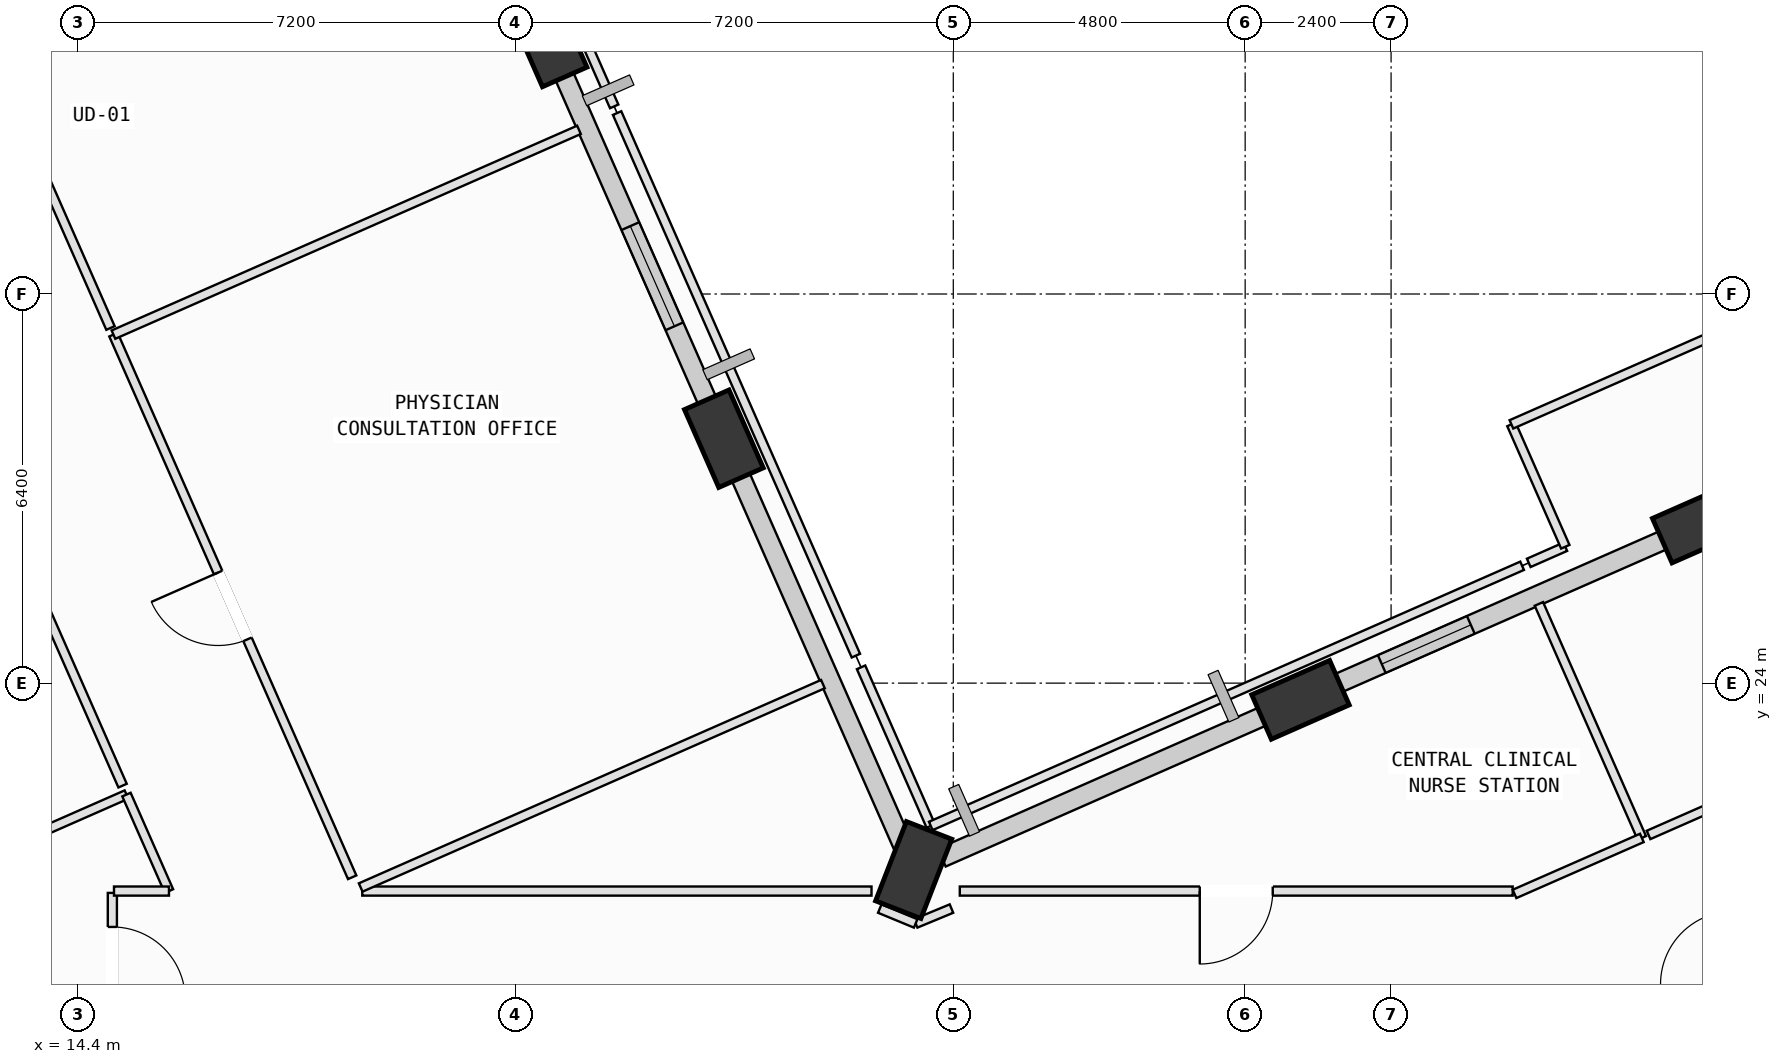
"""IFC4 building model, lengths in metres.
Left out: names, types, materials, properties, quantities, classifications, styles, units other than length and angle.
Written with IfcOpenShell. Run it as: python <this file> out.ifc"""

import sys

from ifc_helpers import new_model, si_unit, direction, frame, frame_2d, origin, origin_2d, place, context, subcontext, project, spatial, rectangle, extrude, element, fill, save


model = new_model("IFC4")
c1 = context("Model", 3, precision=1e-05, world=origin(), true_north=direction((0.0, 1.0)))
c2 = subcontext(c1, "Body", "Model", "MODEL_VIEW")
j1 = project(units=[si_unit("LENGTHUNIT", "METRE"), si_unit("PLANEANGLEUNIT", "RADIAN")], contexts=[c1])
p1 = place(None, origin())
s1 = spatial("IfcSite", under=j1, at=p1, CompositionType="ELEMENT")
p2 = place(p1, origin())
s2 = spatial("IfcBuilding", under=s1, at=p2, CompositionType="ELEMENT")
p3 = place(p2, frame((0.0, 0.0, 124.4)))
s3 = spatial("IfcBuildingStorey", under=s2, at=p3, CompositionType="ELEMENT", Elevation=124.4)
p4 = place(p3, frame((41.1, 26.625, 0.002), z_axis=(-0.007815657452, 0.031018390514, 0.999488256534), x_axis=(-0.789216489243, -0.613979935335, 0.012883016466)))
e1 = element("IfcColumn", 1, at=p4, inside=s3, PredefinedType="COLUMN", context=c2, shape_type="SweptSolid", body=[
    extrude(rectangle(XDim=1.4, YDim=0.8, at=origin_2d()), origin(), (0.0, 0.0, 1.0), 3.998),
])
p5 = place(p3, frame((34.51, 23.725, 0.002), z_axis=(0.004459571961, 0.003848671693, 0.999982649822), x_axis=(-0.902915160406, 0.429812266681, 0.002372449991)))
e2 = element("IfcColumn", 2, at=p5, inside=s3, PredefinedType="COLUMN", context=c2, shape_type="SweptSolid", body=[
    extrude(rectangle(XDim=1.4, YDim=0.8, at=origin_2d()), origin(), (0.0, 0.0, 1.0), 3.996),
])
p6 = place(p3, frame((28.148, 20.926, 0.002), z_axis=(0.016243980514, -0.022472875297, 0.999615477558), x_axis=(-0.252034809293, 0.967373020719, 0.025843639251)))
e3 = element("IfcColumn", 3, at=p6, inside=s3, PredefinedType="COLUMN", context=c2, shape_type="SweptSolid", body=[
    extrude(rectangle(XDim=1.4, YDim=0.8, at=origin_2d()), origin(), (0.0, 0.0, 1.0), 3.998),
])
p7 = place(p3, frame((25.027, 28.02, 0.002), z_axis=(-0.013064065171, -0.03565146757, 0.999278891532), x_axis=(-0.063457059536, 0.997379243296, 0.034754088053)))
e4 = element("IfcColumn", 4, at=p7, inside=s3, PredefinedType="COLUMN", context=c2, shape_type="SweptSolid", body=[
    extrude(rectangle(XDim=1.4, YDim=0.8, at=origin_2d()), origin(), (0.0, 0.0, 1.0), 3.999),
])
p8 = place(p3, frame((22.127, 34.61, 0.002), z_axis=(-0.040180454618, -0.047801936905, 0.998048348476), x_axis=(0.279502323425, 0.958442212202, 0.057157476053)))
e5 = element("IfcColumn", 5, at=p8, inside=s3, PredefinedType="COLUMN", context=c2, shape_type="SweptSolid", body=[
    extrude(rectangle(XDim=1.4, YDim=0.8, at=origin_2d()), origin(), (0.0, 0.0, 1.0), 4.004),
])
p9 = place(p3, frame((34.974, 23.93, 0.0), z_axis=(0.0, 0.0, 1.0), x_axis=(0.915298223489, 0.402776814227, 0.0)))
e6 = element("IfcWall", 6, at=p9, inside=s3, PredefinedType="SOLIDWALL", context=c2, shape_type="SweptSolid", body=[
    extrude(rectangle(XDim=6.211, YDim=0.32, at=frame_2d((3.105, 0.0))), origin(), (0.0, 0.0, 1.0), 3.165),
])
p10 = place(p9, frame((0.953, 0.0, 0.75)))
e7 = element("IfcOpeningElement", 7, at=p10, cuts=e6, PredefinedType="OPENING", context=c2, shape_type="SweptSolid", body=[
    extrude(rectangle(XDim=1.6, YDim=1.95, at=frame_2d((0.8, 0.975))), frame((0.0, 0.17, 0.0), z_axis=(0.0, -1.0, 0.0), x_axis=(1.0, 0.0, 0.0)), (0.0, 0.0, 1.0), 0.34),
])
p11 = place(p3, frame((28.611, 21.13, 0.0), z_axis=(0.0, 0.0, 1.0), x_axis=(0.915312012357, 0.402745477981, 0.0)))
e8 = element("IfcWall", 8, at=p11, inside=s3, PredefinedType="SOLIDWALL", context=c2, shape_type="SweptSolid", body=[
    extrude(rectangle(XDim=5.96, YDim=0.32, at=frame_2d((2.98, 0.0))), origin(), (0.0, 0.0, 1.0), 3.165),
])
p12 = place(p3, frame((25.248, 27.518, 0.0), z_axis=(0.0, 0.0, 1.0), x_axis=(0.402757978955, -0.915306511715, 0.0)))
e9 = element("IfcWall", 9, at=p12, inside=s3, PredefinedType="SOLIDWALL", context=c2, shape_type="SweptSolid", body=[
    extrude(rectangle(XDim=6.76, YDim=0.32, at=frame_2d((3.38, 0.0))), origin(), (0.0, 0.0, 1.0), 3.165),
])
p13 = place(p3, frame((22.344, 34.117, 0.0), z_axis=(0.0, 0.0, 1.0), x_axis=(0.402732040275, -0.915317924951, 0.0)))
e10 = element("IfcWall", 10, at=p13, inside=s3, PredefinedType="SOLIDWALL", context=c2, shape_type="SweptSolid", body=[
    extrude(rectangle(XDim=6.223, YDim=0.32, at=frame_2d((3.111, 0.0))), origin(), (0.0, 0.0, 1.0), 3.165),
])
p14 = place(p13, frame((2.841, 0.0, 0.75)))
e11 = element("IfcOpeningElement", 11, at=p14, cuts=e10, PredefinedType="OPENING", context=c2, shape_type="SweptSolid", body=[
    extrude(rectangle(XDim=1.8, YDim=2.05, at=frame_2d((0.9, 1.025))), frame((0.0, 0.17, 0.0), z_axis=(0.0, -1.0, 0.0), x_axis=(1.0, 0.0, 0.0)), (0.0, 0.0, 1.0), 0.34),
])
p15 = place(p3, frame((36.5, 16.79, 0.0), z_axis=(0.0, 0.0, 1.0), x_axis=(0.915322583173, 0.402721453034, 0.0)))
e12 = element("IfcWall", 12, at=p15, inside=s3, PredefinedType="PARTITIONING", context=c2, shape_type="SweptSolid", body=[
    extrude(rectangle(XDim=10.012, YDim=0.15, at=frame_2d((5.006, 0.0))), origin(), (0.0, 0.0, 1.0), 2.965),
])
p16 = place(p15, frame((4.406, 0.0, 0.0)))
e13 = element("IfcOpeningElement", 13, at=p16, cuts=e12, PredefinedType="OPENING", context=c2, shape_type="SweptSolid", body=[
    extrude(rectangle(XDim=1.2, YDim=2.15, at=frame_2d((0.6, 1.075))), frame((0.0, 0.085, 0.0), z_axis=(0.0, -1.0, 0.0), x_axis=(1.0, 0.0, 0.0)), (0.0, 0.0, 1.0), 0.17),
])
p17 = place(p3, frame((14.97, 20.55, 0.0), z_axis=(0.0, 0.0, 1.0), x_axis=(0.0, -1.0, 0.0)))
e14 = element("IfcWall", 14, at=p17, inside=s3, PredefinedType="PARTITIONING", context=c2, shape_type="SweptSolid", body=[
    extrude(rectangle(XDim=2.32, YDim=0.15, at=frame_2d((1.16, 0.0))), origin(), (0.0, 0.0, 1.0), 3.78),
])
p18 = place(p17, frame((0.56, 0.0, 0.0)))
e15 = element("IfcOpeningElement", 15, at=p18, cuts=e14, PredefinedType="OPENING", context=c2, shape_type="SweptSolid", body=[
    extrude(rectangle(XDim=1.2, YDim=2.15, at=frame_2d((0.6, 1.075))), frame((0.0, 0.085, 0.0), z_axis=(0.0, -1.0, 0.0), x_axis=(1.0, 0.0, 0.0)), (0.0, 0.0, 1.0), 0.17),
])
p19 = place(p3, frame((6.584, 18.376, 0.0), z_axis=(0.0, 0.0, 1.0), x_axis=(0.915349059645, 0.402661270806, 0.0)))
e16 = element("IfcWall", 16, at=p19, inside=s3, PredefinedType="PARTITIONING", context=c2, shape_type="SweptSolid", body=[
    extrude(rectangle(XDim=9.415, YDim=0.15, at=frame_2d((4.708, 0.0))), origin(), (0.0, 0.0, 1.0), 3.78),
])
p20 = place(p3, frame((15.202, 22.167, 0.0), z_axis=(0.0, 0.0, 1.0), x_axis=(0.403092455814, -0.915159260493, 0.0)))
e17 = element("IfcWall", 17, at=p20, inside=s3, PredefinedType="PARTITIONING", context=c2, shape_type="SweptSolid", body=[
    extrude(rectangle(XDim=1.734, YDim=0.15, at=frame_2d((0.867, 0.0))), origin(), (0.0, 0.0, 1.0), 3.78),
])
p21 = place(p3, frame((15.901, 20.58, 0.0), z_axis=(0.0, 0.0, 1.0), x_axis=(-1.0, 0.0, 0.0)))
e18 = element("IfcWall", 18, at=p21, inside=s3, PredefinedType="PARTITIONING", context=c2, shape_type="SweptSolid", body=[
    extrude(rectangle(XDim=0.904, YDim=0.15, at=frame_2d((0.452, 0.0))), origin(), (0.0, 0.0, 1.0), 3.78),
])
p22 = place(p3, frame((9.805, 34.433, 0.0), z_axis=(0.0, 0.0, 1.0), x_axis=(0.402775689137, -0.915298718583, 0.0)))
e19 = element("IfcWall", 19, at=p22, inside=s3, PredefinedType="PARTITIONING", context=c2, shape_type="SweptSolid", body=[
    extrude(rectangle(XDim=13.241, YDim=0.15, at=frame_2d((6.62, 0.0))), origin(), (0.0, 0.0, 1.0), 2.965),
])
p23 = place(p22, frame((6.02, 0.0, 0.0)))
e20 = element("IfcOpeningElement", 20, at=p23, cuts=e19, PredefinedType="OPENING", context=c2, shape_type="SweptSolid", body=[
    extrude(rectangle(XDim=1.2, YDim=2.15, at=frame_2d((0.6, 1.075))), frame((0.0, 0.085, 0.0), z_axis=(0.0, -1.0, 0.0), x_axis=(1.0, 0.0, 0.0)), (0.0, 0.0, 1.0), 0.17),
])
p24 = place(p3, frame((38.0, 20.58, 0.0), z_axis=(0.0, 0.0, 1.0), x_axis=(-1.0, 0.0, 0.0)))
e21 = element("IfcWall", 21, at=p24, inside=s3, PredefinedType="PARTITIONING", context=c2, shape_type="SweptSolid", body=[
    extrude(rectangle(XDim=9.093, YDim=0.15, at=frame_2d((4.546, 0.0))), origin(), (0.0, 0.0, 1.0), 3.365),
])
p25 = place(p24, frame((3.947, 0.0, 0.0)))
e22 = element("IfcOpeningElement", 22, at=p25, cuts=e21, PredefinedType="OPENING", context=c2, shape_type="SweptSolid", body=[
    extrude(rectangle(XDim=1.2, YDim=2.15, at=frame_2d((0.6, 1.075))), frame((0.0, 0.085, 0.0), z_axis=(0.0, -1.0, 0.0), x_axis=(1.0, 0.0, 0.0)), (0.0, 0.0, 1.0), 0.17),
])
p26 = place(p3, frame((28.77, 20.292, 0.0), z_axis=(0.0, 0.0, 1.0), x_axis=(-0.923946844683, -0.382520885967, 0.0)))
e23 = element("IfcWall", 23, at=p26, inside=s3, PredefinedType="PARTITIONING", context=c2, shape_type="SweptSolid", body=[
    extrude(rectangle(XDim=0.638, YDim=0.15, at=frame_2d((0.319, 0.0))), origin(), (0.0, 0.0, 1.0), 3.78),
])
p27 = place(p3, frame((28.181, 20.048, 0.0), z_axis=(0.0, 0.0, 1.0), x_axis=(-0.924114659462, 0.382115291723, 0.0)))
e24 = element("IfcWall", 24, at=p27, inside=s3, PredefinedType="PARTITIONING", context=c2, shape_type="SweptSolid", body=[
    extrude(rectangle(XDim=0.638, YDim=0.15, at=frame_2d((0.319, 0.0))), origin(), (0.0, 0.0, 1.0), 3.78),
])
p28 = place(p3, frame((27.455, 20.58, 0.0), z_axis=(0.0, 0.0, 1.0), x_axis=(-1.0, 0.0, 0.0)))
e25 = element("IfcWall", 25, at=p28, inside=s3, PredefinedType="PARTITIONING", context=c2, shape_type="SweptSolid", body=[
    extrude(rectangle(XDim=8.375, YDim=0.15, at=frame_2d((4.188, 0.0))), origin(), (0.0, 0.0, 1.0), 3.78),
])
p29 = place(p3, frame((19.054, 20.639, 0.0), z_axis=(0.0, 0.0, 1.0), x_axis=(0.915311998294, 0.402745509944, 0.0)))
e26 = element("IfcWall", 26, at=p29, inside=s3, PredefinedType="PARTITIONING", context=c2, shape_type="SweptSolid", body=[
    extrude(rectangle(XDim=8.305, YDim=0.15, at=frame_2d((4.153, 0.0))), origin(), (0.0, 0.0, 1.0), 3.78),
])
p30 = place(p3, frame((27.283, 24.26, 0.0), z_axis=(0.0, 0.0, 1.0), x_axis=(0.402431432168, -0.91545013103, 0.0)))
e27 = element("IfcWall", 27, at=p30, inside=s3, PredefinedType="PARTITIONING", context=c2, shape_type="SweptSolid", body=[
    extrude(rectangle(XDim=2.85, YDim=0.15, at=frame_2d((1.425, 0.0))), origin(), (0.0, 0.0, 1.0), 3.78),
])
p31 = place(p3, frame((28.43, 21.651, 0.0), z_axis=(0.0, 0.0, 1.0), x_axis=(0.915314693601, 0.402739384314, 0.0)))
e28 = element("IfcWall", 28, at=p31, inside=s3, PredefinedType="PARTITIONING", context=c2, shape_type="SweptSolid", body=[
    extrude(rectangle(XDim=10.625, YDim=0.15, at=frame_2d((5.312, 0.0))), origin(), (0.0, 0.0, 1.0), 3.78),
])
p32 = place(p3, frame((38.431, 25.303, 0.0), z_axis=(0.0, 0.0, 1.0), x_axis=(0.402660781554, -0.915349274866, 0.0)))
e29 = element("IfcWall", 29, at=p32, inside=s3, PredefinedType="PARTITIONING", context=c2, shape_type="SweptSolid", body=[
    extrude(rectangle(XDim=4.205, YDim=0.15, at=frame_2d((2.103, 0.0))), origin(), (0.0, 0.0, 1.0), 3.78),
])
p33 = place(p3, frame((40.124, 21.454, 0.0), z_axis=(0.0, 0.0, 1.0), x_axis=(-0.915349649127, -0.402659930763, 0.0)))
e30 = element("IfcWall", 30, at=p33, inside=s3, PredefinedType="PARTITIONING", context=c2, shape_type="SweptSolid", body=[
    extrude(rectangle(XDim=2.288, YDim=0.15, at=frame_2d((1.144, 0.0))), origin(), (0.0, 0.0, 1.0), 3.78),
])
p34 = place(p3, frame((55.739, 28.326, 0.0), z_axis=(0.0, 0.0, 1.0), x_axis=(-0.915298880847, -0.402775320396, 0.0)))
e31 = element("IfcWall", 31, at=p34, inside=s3, PredefinedType="PARTITIONING", context=c2, shape_type="SweptSolid", body=[
    extrude(rectangle(XDim=16.94, YDim=0.15, at=frame_2d((8.47, 0.0))), origin(), (0.0, 0.0, 1.0), 2.945),
])
p35 = place(p34, frame((7.87, 0.0, 0.0)))
e32 = element("IfcOpeningElement", 32, at=p35, cuts=e31, PredefinedType="OPENING", context=c2, shape_type="SweptSolid", body=[
    extrude(rectangle(XDim=1.2, YDim=2.15, at=frame_2d((0.6, 1.075))), frame((0.0, 0.085, 0.0), z_axis=(0.0, -1.0, 0.0), x_axis=(1.0, 0.0, 0.0)), (0.0, 0.0, 1.0), 0.17),
])
p36 = place(p3, frame((38.264, 25.978, 0.0), z_axis=(0.0, 0.0, 1.0), x_axis=(0.915079211877, 0.403274144958, 0.0)))
e33 = element("IfcWall", 33, at=p36, inside=s3, PredefinedType="PARTITIONING", context=c2, shape_type="SweptSolid", body=[
    extrude(rectangle(XDim=0.657, YDim=0.15, at=frame_2d((0.328, 0.0))), origin(), (0.0, 0.0, 1.0), 3.78),
])
p37 = place(p3, frame((38.865, 26.243, 0.0), z_axis=(0.0, 0.0, 1.0), x_axis=(-0.402809288305, 0.915283932589, 0.0)))
e34 = element("IfcWall", 34, at=p37, inside=s3, PredefinedType="PARTITIONING", context=c2, shape_type="SweptSolid", body=[
    extrude(rectangle(XDim=2.199, YDim=0.15, at=frame_2d((1.1, 0.0))), origin(), (0.0, 0.0, 1.0), 3.78),
])
p38 = place(p3, frame((37.979, 28.256, 0.0), z_axis=(0.0, 0.0, 1.0), x_axis=(0.915301532005, 0.402769295638, 0.0)))
e35 = element("IfcWall", 35, at=p38, inside=s3, PredefinedType="PARTITIONING", context=c2, shape_type="SweptSolid", body=[
    extrude(rectangle(XDim=7.2, YDim=0.15, at=frame_2d((3.6, 0.0))), origin(), (0.0, 0.0, 1.0), 3.78),
])
p39 = place(p3, frame((18.914, 20.807, 0.0), z_axis=(0.0, 0.0, 1.0), x_axis=(-0.402653023247, 0.915352687695, 0.0)))
e36 = element("IfcWall", 36, at=p39, inside=s3, PredefinedType="PARTITIONING", context=c2, shape_type="SweptSolid", body=[
    extrude(rectangle(XDim=9.75, YDim=0.15, at=frame_2d((4.875, 0.0))), origin(), (0.0, 0.0, 1.0), 3.78),
])
p40 = place(p39, frame((4.275, 0.0, 0.0)))
e37 = element("IfcOpeningElement", 37, at=p40, cuts=e36, PredefinedType="OPENING", context=c2, shape_type="SweptSolid", body=[
    extrude(rectangle(XDim=1.2, YDim=2.15, at=frame_2d((0.6, 1.075))), frame((0.0, 0.085, 0.0), z_axis=(0.0, -1.0, 0.0), x_axis=(1.0, 0.0, 0.0)), (0.0, 0.0, 1.0), 0.17),
])
p41 = place(p3, frame((14.988, 29.732, 0.0), z_axis=(0.0, 0.0, 1.0), x_axis=(0.915336120767, 0.402690682806, 0.0)))
e38 = element("IfcWall", 38, at=p41, inside=s3, PredefinedType="PARTITIONING", context=c2, shape_type="SweptSolid", body=[
    extrude(rectangle(XDim=8.364, YDim=0.15, at=frame_2d((4.182, 0.0))), origin(), (0.0, 0.0, 1.0), 3.78),
])
p42 = place(p3, frame((23.271, 33.376, 0.0), z_axis=(0.0, 0.0, 1.0), x_axis=(0.402773858413, -0.915299524188, 0.0)))
e39 = element("IfcWall", 39, at=p42, inside=s3, PredefinedType="PARTITIONING", context=c2, shape_type="SweptSolid", body=[
    extrude(rectangle(XDim=9.75, YDim=0.15, at=frame_2d((4.875, 0.0))), origin(), (0.0, 0.0, 1.0), 3.78),
])
p43 = place(p3, frame((14.939, 29.841, 0.0), z_axis=(0.0, 0.0, 1.0), x_axis=(-0.402749239906, 0.915310357068, 0.0)))
e40 = element("IfcWall", 40, at=p43, inside=s3, PredefinedType="PARTITIONING", context=c2, shape_type="SweptSolid", body=[
    extrude(rectangle(XDim=6.93, YDim=0.15, at=frame_2d((3.465, 0.0))), origin(), (0.0, 0.0, 1.0), 3.78),
])
p44 = place(p43, frame((3.005, 0.0, 0.0)))
e41 = element("IfcOpeningElement", 41, at=p44, cuts=e40, PredefinedType="OPENING", context=c2, shape_type="SweptSolid", body=[
    extrude(rectangle(XDim=0.92, YDim=2.1, at=frame_2d((0.46, 1.05))), frame((0.0, 0.085, 0.0), z_axis=(0.0, -1.0, 0.0), x_axis=(1.0, 0.0, 0.0)), (0.0, 0.0, 1.0), 0.17),
])
p45 = place(p3, frame((20.432, 39.829, 0.0), z_axis=(0.0, 0.0, 1.0), x_axis=(0.402749239906, -0.915310357068, 0.0)))
e42 = element("IfcWall", 42, at=p45, inside=s3, PredefinedType="PARTITIONING", context=c2, shape_type="SweptSolid", body=[
    extrude(rectangle(XDim=6.93, YDim=0.15, at=frame_2d((3.465, 0.0))), origin(), (0.0, 0.0, 1.0), 3.78),
])
p46 = place(p10, origin())
e43 = element("IfcWindow", 43, at=p46, inside=s3, PartitioningType="SINGLE_PANEL", PredefinedType="WINDOW", context=c2, shape_type="SweptSolid", body=[
    extrude(rectangle(XDim=1.6, YDim=1.95, at=frame_2d((0.8, 0.975))), frame((0.0, 0.03, 0.0), z_axis=(0.0, -1.0, 0.0), x_axis=(1.0, 0.0, 0.0)), (0.0, 0.0, 1.0), 0.06),
])
fill(e7, e43)
p47 = place(p14, origin())
e44 = element("IfcWindow", 44, at=p47, inside=s3, PartitioningType="SINGLE_PANEL", PredefinedType="WINDOW", context=c2, shape_type="SweptSolid", body=[
    extrude(rectangle(XDim=1.8, YDim=2.05, at=frame_2d((0.9, 1.025))), frame((0.0, 0.03, 0.0), z_axis=(0.0, -1.0, 0.0), x_axis=(1.0, 0.0, 0.0)), (0.0, 0.0, 1.0), 0.06),
])
fill(e11, e44)
p48 = place(p16, origin())
e45 = element("IfcDoor", 45, at=p48, inside=s3, OperationType="SINGLE_SWING_RIGHT", PredefinedType="DOOR", context=c2, shape_type="SweptSolid", body=[
    extrude(rectangle(XDim=1.2, YDim=2.15, at=frame_2d((0.6, 1.075))), frame((0.0, 0.025, 0.0), z_axis=(0.0, -1.0, 0.0), x_axis=(1.0, 0.0, 0.0)), (0.0, 0.0, 1.0), 0.05),
])
fill(e13, e45)
p49 = place(p18, origin())
e46 = element("IfcDoor", 46, at=p49, inside=s3, OperationType="SINGLE_SWING_RIGHT", PredefinedType="DOOR", context=c2, shape_type="SweptSolid", body=[
    extrude(rectangle(XDim=1.2, YDim=2.15, at=frame_2d((0.6, 1.075))), frame((0.0, 0.025, 0.0), z_axis=(0.0, -1.0, 0.0), x_axis=(1.0, 0.0, 0.0)), (0.0, 0.0, 1.0), 0.05),
])
fill(e15, e46)
p50 = place(p25, origin())
e47 = element("IfcDoor", 47, at=p50, inside=s3, OperationType="SINGLE_SWING_RIGHT", PredefinedType="DOOR", context=c2, shape_type="SweptSolid", body=[
    extrude(rectangle(XDim=1.2, YDim=2.15, at=frame_2d((0.6, 1.075))), frame((0.0, 0.025, 0.0), z_axis=(0.0, -1.0, 0.0), x_axis=(1.0, 0.0, 0.0)), (0.0, 0.0, 1.0), 0.05),
])
fill(e22, e47)
p51 = place(p40, origin())
e48 = element("IfcDoor", 48, at=p51, inside=s3, OperationType="SINGLE_SWING_RIGHT", PredefinedType="DOOR", context=c2, shape_type="SweptSolid", body=[
    extrude(rectangle(XDim=1.2, YDim=2.15, at=frame_2d((0.6, 1.075))), frame((0.0, 0.025, 0.0), z_axis=(0.0, -1.0, 0.0), x_axis=(1.0, 0.0, 0.0)), (0.0, 0.0, 1.0), 0.05),
])
fill(e37, e48)
save(model, sys.argv[1])
